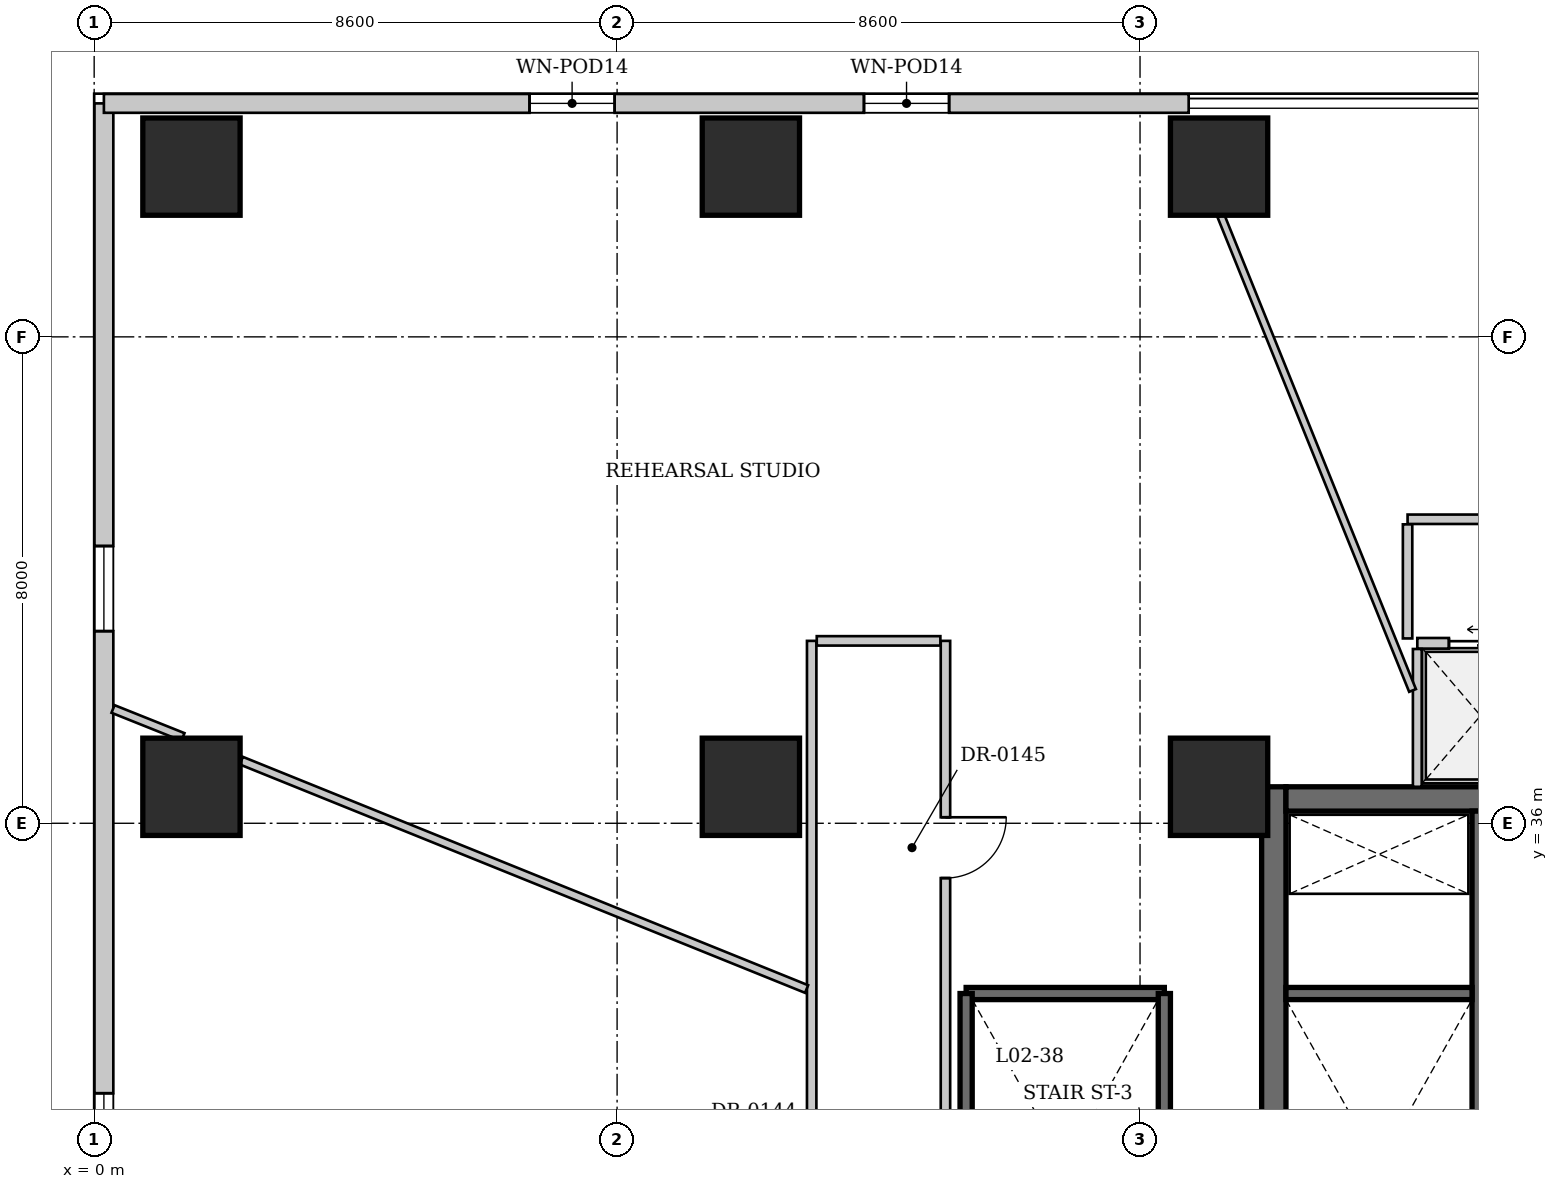
"""IFC4 building model, lengths in metres.
Left out: names, types, materials, properties, quantities, classifications, styles, units other than length and angle.
Written with IfcOpenShell. Run it as: python <this file> out.ifc"""

import sys

from ifc_helpers import new_model, si_unit, direction, frame, frame_2d, origin, origin_2d, place, context, subcontext, project, spatial, rectangle, extrude, source, transform, mapped, element, fill, save


model = new_model("IFC4")
c1 = context("Model", 3, precision=1e-05, world=origin(), true_north=direction((0.0, 1.0)))
c2 = subcontext(c1, "Body", "Model", "MODEL_VIEW")
j1 = project(units=[si_unit("LENGTHUNIT", "METRE"), si_unit("PLANEANGLEUNIT", "RADIAN")], contexts=[c1])
p1 = place(None, origin())
s1 = spatial("IfcSite", under=j1, at=p1, CompositionType="ELEMENT")
p2 = place(p1, origin())
s2 = spatial("IfcBuilding", under=s1, at=p2, CompositionType="ELEMENT")
p3 = place(p2, frame((0.0, 0.0, 9.8)))
s3 = spatial("IfcBuildingStorey", under=s2, at=p3, CompositionType="ELEMENT", Elevation=9.8)
for number, where, z_axis, x_axis in (
    (1, (1.6, 36.6, 0.0), (0.0, 0.0, 1.0), (1.0, 0.0, 0.0)),
    (2, (1.6, 46.8, 0.0), (0.0, 0.0, 1.0), (1.0, 0.0, 0.0)),
    (3, (10.8, 46.8, 0.0), (0.0, 0.0, 1.0), (1.0, 0.0, 0.0)),
    (4, (18.5, 46.8, 0.0), (0.0, 0.0, 1.0), (1.0, 0.0, 0.0)),
    (5, (10.8, 36.6, 0.0), (0.0, 0.0, 1.0), (1.0, 0.0, 0.0)),
    (6, (18.5, 36.6, 0.0), (0.0, 0.0, 1.0), (1.0, 0.0, 0.0)),
):
    element("IfcColumn", number, at=place(p3, frame(where, z_axis=z_axis, x_axis=x_axis)), inside=s3, PredefinedType="COLUMN", context=c2, shape_type="SweptSolid", body=[
        extrude(rectangle(XDim=1.6, YDim=1.6, at=origin_2d()), origin(), (0.0, 0.0, 1.0), 4.3),
    ])
p4 = place(p3, frame((0.16, 8.16, 0.0), z_axis=(0.0, 0.0, 1.0), x_axis=(0.0, 1.0, 0.0)))
e7 = element("IfcWall", 7, at=p4, inside=s3, PredefinedType="SOLIDWALL", context=c2, shape_type="SweptSolid", body=[
    extrude(rectangle(XDim=39.68, YDim=0.31, at=frame_2d((19.84, 0.0))), origin(), (0.0, 0.0, 1.0), 4.05),
])
p5 = place(p4, frame((5.0, 0.0, 0.95)))
e8 = element("IfcOpeningElement", 8, at=p5, cuts=e7, PredefinedType="OPENING", context=c2, shape_type="SweptSolid", body=[
    extrude(rectangle(XDim=1.4, YDim=2.2, at=frame_2d((0.7, 1.1))), frame((0.0, 0.165, 0.0), z_axis=(0.0, -1.0, 0.0), x_axis=(1.0, 0.0, 0.0)), (0.0, 0.0, 1.0), 0.33),
])
p6 = place(p4, frame((13.0, 0.0, 0.95)))
e9 = element("IfcOpeningElement", 9, at=p6, cuts=e7, PredefinedType="OPENING", context=c2, shape_type="SweptSolid", body=[
    extrude(rectangle(XDim=1.4, YDim=2.2, at=frame_2d((0.7, 1.1))), frame((0.0, 0.165, 0.0), z_axis=(0.0, -1.0, 0.0), x_axis=(1.0, 0.0, 0.0)), (0.0, 0.0, 1.0), 0.33),
])
p7 = place(p4, frame((22.0, 0.0, 0.95)))
e10 = element("IfcOpeningElement", 10, at=p7, cuts=e7, PredefinedType="OPENING", context=c2, shape_type="SweptSolid", body=[
    extrude(rectangle(XDim=1.4, YDim=2.2, at=frame_2d((0.7, 1.1))), frame((0.0, 0.165, 0.0), z_axis=(0.0, -1.0, 0.0), x_axis=(1.0, 0.0, 0.0)), (0.0, 0.0, 1.0), 0.33),
])
p8 = place(p4, frame((31.0, 0.0, 0.95)))
e11 = element("IfcOpeningElement", 11, at=p8, cuts=e7, PredefinedType="OPENING", context=c2, shape_type="SweptSolid", body=[
    extrude(rectangle(XDim=1.4, YDim=2.2, at=frame_2d((0.7, 1.1))), frame((0.0, 0.165, 0.0), z_axis=(0.0, -1.0, 0.0), x_axis=(1.0, 0.0, 0.0)), (0.0, 0.0, 1.0), 0.33),
])
p9 = place(p3, frame((0.16, 47.84, 0.0), z_axis=(0.0, 0.0, 1.0), x_axis=(1.0, 0.0, 0.0)))
e12 = element("IfcWall", 12, at=p9, inside=s3, PredefinedType="SOLIDWALL", context=c2, shape_type="SweptSolid", body=[
    extrude(rectangle(XDim=17.84, YDim=0.31, at=frame_2d((8.92, 0.0))), origin(), (0.0, 0.0, 1.0), 4.05),
])
p10 = place(p9, frame((7.0, 0.0, 0.95)))
e13 = element("IfcOpeningElement", 13, at=p10, cuts=e12, PredefinedType="OPENING", context=c2, shape_type="SweptSolid", body=[
    extrude(rectangle(XDim=1.4, YDim=2.2, at=frame_2d((0.7, 1.1))), frame((0.0, 0.165, 0.0), z_axis=(0.0, -1.0, 0.0), x_axis=(1.0, 0.0, 0.0)), (0.0, 0.0, 1.0), 0.33),
])
p11 = place(p9, frame((12.5, 0.0, 0.95)))
e14 = element("IfcOpeningElement", 14, at=p11, cuts=e12, PredefinedType="OPENING", context=c2, shape_type="SweptSolid", body=[
    extrude(rectangle(XDim=1.4, YDim=2.2, at=frame_2d((0.7, 1.1))), frame((0.0, 0.165, 0.0), z_axis=(0.0, -1.0, 0.0), x_axis=(1.0, 0.0, 0.0)), (0.0, 0.0, 1.0), 0.33),
])
p12 = place(p3, frame((19.4, 25.8, 0.0), z_axis=(0.0, 0.0, 1.0), x_axis=(0.0, 1.0, 0.0)))
e15 = element("IfcWall", 15, at=p12, inside=s3, PredefinedType="SHEAR", context=c2, shape_type="SweptSolid", body=[
    extrude(rectangle(XDim=10.8, YDim=0.4, at=frame_2d((5.4, 0.0))), origin(), (0.0, 0.0, 1.0), 4.6),
])
p13 = place(p3, frame((19.6, 36.4, 0.0), z_axis=(0.0, 0.0, 1.0), x_axis=(1.0, 0.0, 0.0)))
e16 = element("IfcWall", 16, at=p13, inside=s3, PredefinedType="SHEAR", context=c2, shape_type="SweptSolid", body=[
    extrude(rectangle(XDim=12.8, YDim=0.4, at=frame_2d((6.4, 0.0))), origin(), (0.0, 0.0, 1.0), 4.6),
])
p14 = place(p3, frame((22.76, 26.2, 0.0), z_axis=(0.0, 0.0, 1.0), x_axis=(0.0, 1.0, 0.0)))
e17 = element("IfcWall", 17, at=p14, inside=s3, PredefinedType="SHEAR", context=c2, shape_type="SweptSolid", body=[
    extrude(rectangle(XDim=10.0, YDim=0.2, at=frame_2d((5.0, 0.0))), origin(), (0.0, 0.0, 1.0), 4.6),
])
p15 = place(p3, frame((19.6, 33.2, 0.0), z_axis=(0.0, 0.0, 1.0), x_axis=(1.0, 0.0, 0.0)))
e18 = element("IfcWall", 18, at=p15, inside=s3, PredefinedType="SHEAR", context=c2, shape_type="SweptSolid", body=[
    extrude(rectangle(XDim=3.06, YDim=0.2, at=frame_2d((1.53, 0.0))), origin(), (0.0, 0.0, 1.0), 4.6),
])
p16 = place(p3, frame((21.76, 38.96, 0.0), z_axis=(0.0, 0.0, 1.0), x_axis=(1.0, 0.0, 0.0)))
e19 = element("IfcWall", 19, at=p16, inside=s3, PredefinedType="SOLIDWALL", context=c2, shape_type="SweptSolid", body=[
    extrude(rectangle(XDim=6.2, YDim=0.175, at=frame_2d((3.1, 0.0))), origin(), (0.0, 0.0, 1.0), 4.3),
])
p17 = place(p16, frame((0.52, 0.0, 0.0)))
e20 = element("IfcOpeningElement", 20, at=p17, cuts=e19, PredefinedType="OPENING", context=c2, shape_type="SweptSolid", body=[
    extrude(rectangle(XDim=1.05, YDim=2.15, at=frame_2d((0.525, 1.075))), frame((0.0, 0.098, 0.0), z_axis=(0.0, -1.0, 0.0), x_axis=(1.0, 0.0, 0.0)), (0.0, 0.0, 1.0), 0.195),
])
p18 = place(p16, frame((2.58, 0.0, 0.0)))
e21 = element("IfcOpeningElement", 21, at=p18, cuts=e19, PredefinedType="OPENING", context=c2, shape_type="SweptSolid", body=[
    extrude(rectangle(XDim=1.05, YDim=2.15, at=frame_2d((0.525, 1.075))), frame((0.0, 0.098, 0.0), z_axis=(0.0, -1.0, 0.0), x_axis=(1.0, 0.0, 0.0)), (0.0, 0.0, 1.0), 0.195),
])
p19 = place(p16, frame((4.64, 0.0, 0.0)))
e22 = element("IfcOpeningElement", 22, at=p19, cuts=e19, PredefinedType="OPENING", context=c2, shape_type="SweptSolid", body=[
    extrude(rectangle(XDim=1.05, YDim=2.15, at=frame_2d((0.525, 1.075))), frame((0.0, 0.098, 0.0), z_axis=(0.0, -1.0, 0.0), x_axis=(1.0, 0.0, 0.0)), (0.0, 0.0, 1.0), 0.195),
])
p20 = place(p3, frame((21.76, 36.6, 0.0), z_axis=(0.0, 0.0, 1.0), x_axis=(0.0, 1.0, 0.0)))
e23 = element("IfcWall", 23, at=p20, inside=s3, PredefinedType="SOLIDWALL", context=c2, shape_type="SweptSolid", body=[
    extrude(rectangle(XDim=2.266, YDim=0.145, at=frame_2d((1.133, 0.0))), origin(), (0.0, 0.0, 1.0), 4.3),
])
p21 = place(p3, frame((14.34, 33.2, 0.0), z_axis=(0.0, 0.0, 1.0), x_axis=(1.0, 0.0, 0.0)))
e24 = element("IfcWall", 24, at=p21, inside=s3, PredefinedType="SHEAR", context=c2, shape_type="SweptSolid", body=[
    extrude(rectangle(XDim=3.26, YDim=0.2, at=frame_2d((1.63, 0.0))), origin(), (0.0, 0.0, 1.0), 4.6),
])
for number, where, z_axis, x_axis in (
    (25, (14.34, 26.1, 0.0), (0.0, 0.0, 1.0), (0.0, 1.0, 0.0)),
    (26, (17.6, 26.1, 0.0), (0.0, 0.0, 1.0), (0.0, 1.0, 0.0)),
):
    element("IfcWall", number, at=place(p3, frame(where, z_axis=z_axis, x_axis=x_axis)), inside=s3, PredefinedType="SHEAR", context=c2, shape_type="SweptSolid", body=[
        extrude(rectangle(XDim=7.1, YDim=0.2, at=frame_2d((3.55, 0.0))), origin(), (0.0, 0.0, 1.0), 4.6),
    ])
p22 = place(p3, frame((11.8, 26.12, 0.0), z_axis=(0.0, 0.0, 1.0), x_axis=(0.0, 1.0, 0.0)))
e27 = element("IfcWall", 27, at=p22, inside=s3, PredefinedType="PARTITIONING", context=c2, shape_type="SweptSolid", body=[
    extrude(rectangle(XDim=12.88, YDim=0.155, at=frame_2d((6.44, 0.0))), origin(), (0.0, 0.0, 1.0), 4.3),
])
p23 = place(p22, frame((3.159, 0.0, 0.0)))
e28 = element("IfcOpeningElement", 28, at=p23, cuts=e27, PredefinedType="OPENING", context=c2, shape_type="SweptSolid", body=[
    extrude(rectangle(XDim=0.95, YDim=2.15, at=frame_2d((0.475, 1.075))), frame((0.0, 0.087, 0.0), z_axis=(0.0, -1.0, 0.0), x_axis=(1.0, 0.0, 0.0)), (0.0, 0.0, 1.0), 0.175),
])
p24 = place(p3, frame((14.0, 39.0, 0.0), z_axis=(0.0, 0.0, 1.0), x_axis=(0.0, -1.0, 0.0)))
e29 = element("IfcWall", 29, at=p24, inside=s3, PredefinedType="PARTITIONING", context=c2, shape_type="SweptSolid", body=[
    extrude(rectangle(XDim=12.88, YDim=0.155, at=frame_2d((6.44, 0.0))), origin(), (0.0, 0.0, 1.0), 4.3),
])
p25 = place(p24, frame((2.901, 0.0, 0.0)))
e30 = element("IfcOpeningElement", 30, at=p25, cuts=e29, PredefinedType="OPENING", context=c2, shape_type="SweptSolid", body=[
    extrude(rectangle(XDim=1.0, YDim=2.15, at=frame_2d((0.5, 1.075))), frame((0.0, 0.087, 0.0), z_axis=(0.0, -1.0, 0.0), x_axis=(1.0, 0.0, 0.0)), (0.0, 0.0, 1.0), 0.175),
])
p26 = place(p3, frame((21.6, 41.0, 0.0), z_axis=(0.0, 0.0, 1.0), x_axis=(1.0, 0.0, 0.0)))
e31 = element("IfcWall", 31, at=p26, inside=s3, PredefinedType="PARTITIONING", context=c2, shape_type="SweptSolid", body=[
    extrude(rectangle(XDim=14.2, YDim=0.155, at=frame_2d((7.1, 0.0))), origin(), (0.0, 0.0, 1.0), 4.3),
])
p27 = place(p26, frame((7.065, 0.0, 0.0)))
e32 = element("IfcOpeningElement", 32, at=p27, cuts=e31, PredefinedType="OPENING", context=c2, shape_type="SweptSolid", body=[
    extrude(rectangle(XDim=0.95, YDim=2.15, at=frame_2d((0.475, 1.075))), frame((0.0, 0.087, 0.0), z_axis=(0.0, -1.0, 0.0), x_axis=(1.0, 0.0, 0.0)), (0.0, 0.0, 1.0), 0.175),
])
p28 = place(p3, frame((11.884, 39.0, 0.0), z_axis=(0.0, 0.0, 1.0), x_axis=(1.0, 0.0, 0.0)))
e33 = element("IfcWall", 33, at=p28, inside=s3, PredefinedType="PARTITIONING", context=c2, shape_type="SweptSolid", body=[
    extrude(rectangle(XDim=2.033, YDim=0.155, at=frame_2d((1.017, 0.0))), origin(), (0.0, 0.0, 1.0), 4.3),
])
p29 = place(p3, frame((21.6, 39.04, 0.0), z_axis=(0.0, 0.0, 1.0), x_axis=(0.0, 1.0, 0.0)))
e34 = element("IfcWall", 34, at=p29, inside=s3, PredefinedType="PARTITIONING", context=c2, shape_type="SweptSolid", body=[
    extrude(rectangle(XDim=1.876, YDim=0.155, at=frame_2d((0.938, 0.0))), origin(), (0.0, 0.0, 1.0), 4.3),
])
p30 = place(p3, frame((21.681, 38.184, 0.0), z_axis=(0.0, 0.0, 1.0), x_axis=(-0.374369058087, 0.927279789679, 0.0)))
e35 = element("IfcWall", 35, at=p30, inside=s3, PredefinedType="PARTITIONING", context=c2, shape_type="SweptSolid", body=[
    extrude(rectangle(XDim=8.418, YDim=0.12, at=frame_2d((4.209, 0.0))), origin(), (0.0, 0.0, 1.0), 4.3),
])
p31 = place(p3, frame((11.717, 33.274, 0.0), z_axis=(0.0, 0.0, 1.0), x_axis=(-0.927174675493, 0.374629311619, 0.0)))
e36 = element("IfcWall", 36, at=p31, inside=s3, PredefinedType="PARTITIONING", context=c2, shape_type="SweptSolid", body=[
    extrude(rectangle(XDim=10.027, YDim=0.135, at=frame_2d((5.013, 0.0))), origin(), (0.0, 0.0, 1.0), 4.3),
])
p32 = place(p3, frame((1.46, 37.42, 0.0), z_axis=(0.0, 0.0, 1.0), x_axis=(-0.928476690885, 0.371390676354, 0.0)))
e37 = element("IfcWall", 37, at=p32, inside=s3, PredefinedType="PARTITIONING", context=c2, shape_type="SweptSolid", body=[
    extrude(rectangle(XDim=1.239, YDim=0.135, at=frame_2d((0.619, 0.0))), origin(), (0.0, 0.0, 1.0), 4.3),
])
m1 = source(origin(), c2, "Body", "SweptSolid", [
    extrude(rectangle(XDim=1.4, YDim=2.2, at=frame_2d((0.7, 1.1))), frame((0.0, 0.03, 0.0), z_axis=(0.0, -1.0, 0.0), x_axis=(1.0, 0.0, 0.0)), (0.0, 0.0, 1.0), 0.06),
])
p33 = place(p10, origin())
e38 = element("IfcWindow", 38, at=p33, inside=s3, PartitioningType="SINGLE_PANEL", PredefinedType="WINDOW", context=c2, shape_type="MappedRepresentation", body=[
    mapped(m1, transform((0.0, 0.0, 0.0), x_axis=(1.0, 0.0, 0.0), y_axis=(0.0, 1.0, 0.0), z_axis=(0.0, 0.0, 1.0), scale=1.0)),
])
fill(e13, e38)
p34 = place(p11, origin())
e39 = element("IfcWindow", 39, at=p34, inside=s3, PartitioningType="SINGLE_PANEL", PredefinedType="WINDOW", context=c2, shape_type="MappedRepresentation", body=[
    mapped(m1, transform((0.0, 0.0, 0.0), x_axis=(1.0, 0.0, 0.0), y_axis=(0.0, 1.0, 0.0), z_axis=(0.0, 0.0, 1.0), scale=1.0)),
])
fill(e14, e39)
p35 = place(p7, origin())
e40 = element("IfcWindow", 40, at=p35, inside=s3, PartitioningType="SINGLE_PANEL", PredefinedType="WINDOW", context=c2, shape_type="MappedRepresentation", body=[
    mapped(m1, transform((0.0, 0.0, 0.0), x_axis=(1.0, 0.0, 0.0), y_axis=(0.0, 1.0, 0.0), z_axis=(0.0, 0.0, 1.0), scale=1.0)),
])
fill(e10, e40)
p36 = place(p8, origin())
e41 = element("IfcWindow", 41, at=p36, inside=s3, PartitioningType="SINGLE_PANEL", PredefinedType="WINDOW", context=c2, shape_type="MappedRepresentation", body=[
    mapped(m1, transform((0.0, 0.0, 0.0), x_axis=(1.0, 0.0, 0.0), y_axis=(0.0, 1.0, 0.0), z_axis=(0.0, 0.0, 1.0), scale=1.0)),
])
fill(e11, e41)
m2 = source(origin(), c2, "Body", "SweptSolid", [
    extrude(rectangle(XDim=1.05, YDim=2.15, at=frame_2d((0.525, 1.075))), frame((0.0, 0.025, 0.0), z_axis=(0.0, -1.0, 0.0), x_axis=(1.0, 0.0, 0.0)), (0.0, 0.0, 1.0), 0.05),
])
p37 = place(p17, origin())
e42 = element("IfcDoor", 42, at=p37, inside=s3, OperationType="SLIDING_TO_LEFT", PredefinedType="DOOR", context=c2, shape_type="MappedRepresentation", body=[
    mapped(m2, transform((0.0, 0.0, 0.0), x_axis=(1.0, 0.0, 0.0), y_axis=(0.0, 1.0, 0.0), z_axis=(0.0, 0.0, 1.0), scale=1.0)),
])
fill(e20, e42)
m3 = source(origin(), c2, "Body", "SweptSolid", [
    extrude(rectangle(XDim=1.0, YDim=2.15, at=frame_2d((0.5, 1.075))), frame((0.0, 0.025, 0.0), z_axis=(0.0, -1.0, 0.0), x_axis=(1.0, 0.0, 0.0)), (0.0, 0.0, 1.0), 0.05),
])
p38 = place(p25, origin())
e43 = element("IfcDoor", 43, at=p38, inside=s3, OperationType="SINGLE_SWING_LEFT", PredefinedType="DOOR", context=c2, shape_type="MappedRepresentation", body=[
    mapped(m3, transform((0.0, 0.0, 0.0), x_axis=(1.0, 0.0, 0.0), y_axis=(0.0, 1.0, 0.0), z_axis=(0.0, 0.0, 1.0), scale=1.0)),
])
fill(e30, e43)
save(model, sys.argv[1])
